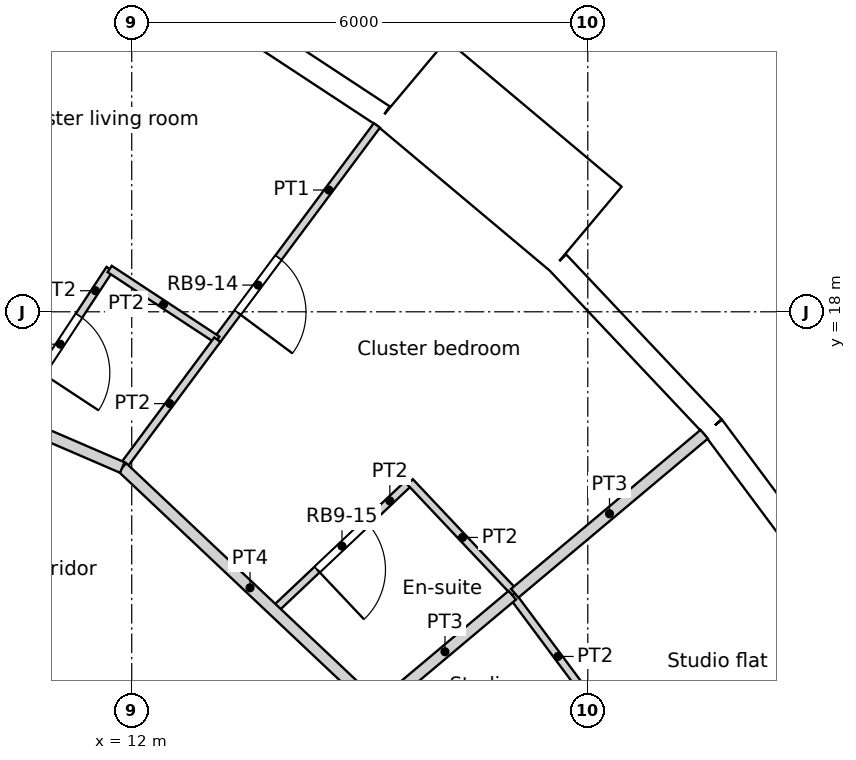
"""IFC4 building model, lengths in metres.
Left out: names, types, materials, properties, quantities, classifications, styles, units other than length and angle.
Written with IfcOpenShell. Run it as: python <this file> out.ifc"""

import sys

from ifc_helpers import new_model, si_unit, direction, frame, frame_2d, origin, origin_2d, place, context, subcontext, project, spatial, rectangle, circle, extrude, element, fill, save


model = new_model("IFC4")
c1 = context("Model", 3, precision=1e-05, world=origin(), true_north=direction((0.0, 1.0)))
c2 = subcontext(c1, "Body", "Model", "MODEL_VIEW")
j1 = project(units=[si_unit("LENGTHUNIT", "METRE"), si_unit("PLANEANGLEUNIT", "RADIAN")], contexts=[c1])
p1 = place(None, origin())
s1 = spatial("IfcSite", under=j1, at=p1, CompositionType="ELEMENT")
p2 = place(p1, origin())
s2 = spatial("IfcBuilding", under=s1, at=p2, CompositionType="ELEMENT")
p3 = place(p2, frame((0.0, 0.0, 212.4)))
s3 = spatial("IfcBuildingStorey", under=s2, at=p3, CompositionType="ELEMENT", Elevation=212.4)
for number, where, z_axis, x_axis in (
    (1, (18.805, 15.779, 0.0), (0.0, 0.0, 1.0), (1.0, 0.0, 0.0)),
    (2, (14.659, 19.69, 0.0), (0.0, 0.0, 1.0), (1.0, 0.0, 0.0)),
):
    element("IfcColumn", number, at=place(p3, frame(where, z_axis=z_axis, x_axis=x_axis)), inside=s3, PredefinedType="COLUMN", context=c2, shape_type="SweptSolid", body=[
        extrude(circle(Radius=0.6, at=origin_2d()), origin(), (0.0, 0.0, 1.0), 3.6),
    ])
p4 = place(p3, frame((11.735, 14.716, 0.0), z_axis=(0.0, 0.0, 1.0), x_axis=(1.0, 0.0, 0.0)))
e3 = element("IfcColumn", 3, at=p4, inside=s3, PredefinedType="COLUMN", context=c2, shape_type="SweptSolid", body=[
    extrude(circle(Radius=0.65, at=origin_2d()), origin(), (0.0, 0.0, 1.0), 3.6),
])
p5 = place(p3, frame((21.422, 14.101, 0.0), z_axis=(0.0, 0.0, 1.0), x_axis=(-0.597197580538, 0.80209416517, 0.0)))
e4 = element("IfcWall", 4, at=p5, inside=s3, PredefinedType="SOLIDWALL", context=c2, shape_type="SweptSolid", body=[
    extrude(rectangle(XDim=2.973, YDim=0.3, at=frame_2d((1.486, 0.0))), origin(), (0.0, 0.0, 1.0), 3.3),
])
p6 = place(p5, frame((1.486, 0.0, 1.55)))
e5 = element("IfcOpeningElement", 5, at=p6, cuts=e4, PredefinedType="OPENING", context=c2, shape_type="SweptSolid", body=[
    extrude(circle(Radius=0.9, at=origin_2d()), frame((0.0, 0.16, 0.0), z_axis=(0.0, -1.0, 0.0), x_axis=(1.0, 0.0, 0.0)), (0.0, 0.0, 1.0), 0.32),
])
p7 = place(p3, frame((19.647, 16.486, 0.0), z_axis=(0.0, 0.0, 1.0), x_axis=(-0.686235184166, 0.727379730273, 0.0)))
e6 = element("IfcWall", 6, at=p7, inside=s3, PredefinedType="SOLIDWALL", context=c2, shape_type="SweptSolid", body=[
    extrude(rectangle(XDim=2.973, YDim=0.3, at=frame_2d((1.486, 0.0))), origin(), (0.0, 0.0, 1.0), 3.3),
])
p8 = place(p7, frame((1.486, 0.0, 1.55)))
e7 = element("IfcOpeningElement", 7, at=p8, cuts=e6, PredefinedType="OPENING", context=c2, shape_type="SweptSolid", body=[
    extrude(circle(Radius=0.9, at=origin_2d()), frame((0.0, 0.16, 0.0), z_axis=(0.0, -1.0, 0.0), x_axis=(1.0, 0.0, 0.0)), (0.0, 0.0, 1.0), 0.32),
])
p9 = place(p3, frame((17.977, 19.09, -0.3), z_axis=(0.0, 0.0, 1.0), x_axis=(-0.766022196139, 0.642814121673, 0.0)))
e8 = element("IfcWall", 8, at=p9, inside=s3, PredefinedType="ELEMENTEDWALL", context=c2, shape_type="SweptSolid", body=[
    extrude(rectangle(XDim=3.0, YDim=1.45, at=frame_2d((1.5, 0.0))), origin(), (0.0, 0.0, 1.0), 3.6),
])
p10 = place(p9, frame((1.5, 0.0, 1.85)))
e9 = element("IfcOpeningElement", 9, at=p10, cuts=e8, PredefinedType="OPENING", context=c2, shape_type="SweptSolid", body=[
    extrude(circle(Radius=0.9, at=origin_2d()), frame((0.0, 0.735, 0.0), z_axis=(0.0, -1.0, 0.0), x_axis=(1.0, 0.0, 0.0)), (0.0, 0.0, 1.0), 1.47),
])
p11 = place(p3, frame((15.308, 20.578, 0.0), z_axis=(0.0, 0.0, 1.0), x_axis=(-0.835470659512, 0.549535055382, 0.0)))
e10 = element("IfcWall", 10, at=p11, inside=s3, PredefinedType="SOLIDWALL", context=c2, shape_type="SweptSolid", body=[
    extrude(rectangle(XDim=2.973, YDim=0.3, at=frame_2d((1.487, 0.0))), origin(), (0.0, 0.0, 1.0), 3.3),
])
p12 = place(p11, frame((1.486, 0.0, 1.55)))
e11 = element("IfcOpeningElement", 11, at=p12, cuts=e10, PredefinedType="OPENING", context=c2, shape_type="SweptSolid", body=[
    extrude(circle(Radius=0.9, at=origin_2d()), frame((0.0, 0.16, 0.0), z_axis=(0.0, -1.0, 0.0), x_axis=(1.0, 0.0, 0.0)), (0.0, 0.0, 1.0), 0.32),
])
p13 = place(p3, frame((11.877, 15.953, 0.0), z_axis=(0.0, 0.0, 1.0), x_axis=(0.727299029876, -0.686320713035, 0.0)))
e12 = element("IfcWall", 12, at=p13, inside=s3, PredefinedType="PARTITIONING", context=c2, shape_type="SweptSolid", body=[
    extrude(rectangle(XDim=4.617, YDim=0.15, at=frame_2d((2.309, 0.0))), origin(), (0.0, 0.0, 1.0), 3.15),
])
p14 = place(p3, frame((4.452, 16.614, 0.0), z_axis=(0.0, 0.0, 1.0), x_axis=(0.866005203721, -0.500034985904, 0.0)))
e13 = element("IfcWall", 13, at=p14, inside=s3, PredefinedType="PARTITIONING", context=c2, shape_type="SweptSolid", body=[
    extrude(rectangle(XDim=8.903, YDim=0.15, at=frame_2d((4.452, 0.0))), origin(), (0.0, 0.0, 1.0), 3.15),
])
p15 = place(p3, frame((3.453, 19.586, 0.0), z_axis=(0.0, 0.0, 1.0), x_axis=(0.918175908205, -0.396172944044, 0.0)))
e14 = element("IfcWall", 14, at=p15, inside=s3, PredefinedType="PARTITIONING", context=c2, shape_type="SweptSolid", body=[
    extrude(rectangle(XDim=9.173, YDim=0.15, at=frame_2d((4.587, 0.0))), origin(), (0.0, 0.0, 1.0), 3.15),
])
p16 = place(p15, frame((5.531, 0.0, 0.0)))
e15 = element("IfcOpeningElement", 15, at=p16, cuts=e14, PredefinedType="OPENING", context=c2, shape_type="SweptSolid", body=[
    extrude(rectangle(XDim=1.1, YDim=2.1, at=frame_2d((0.55, 1.05))), frame((0.0, 0.075, 0.0), z_axis=(0.0, -1.0, 0.0), x_axis=(1.0, 0.0, 0.0)), (0.0, 0.0, 1.0), 0.15),
])
p17 = place(p3, frame((17.007, 14.271, 0.0), z_axis=(0.0, 0.0, 1.0), x_axis=(0.597019866774, -0.802226450996, 0.0)))
e16 = element("IfcWall", 16, at=p17, inside=s3, PredefinedType="PARTITIONING", context=c2, shape_type="SweptSolid", body=[
    extrude(rectangle(XDim=2.008, YDim=0.1, at=frame_2d((1.004, 0.0))), origin(), (0.0, 0.0, 1.0), 3.15),
])
p18 = place(p3, frame((17.039, 14.297, 0.0), z_axis=(0.0, 0.0, 1.0), x_axis=(0.766046154737, 0.642785569854, 0.0)))
e17 = element("IfcWall", 17, at=p18, inside=s3, PredefinedType="PARTITIONING", context=c2, shape_type="SweptSolid", body=[
    extrude(rectangle(XDim=3.254, YDim=0.15, at=frame_2d((1.627, 0.0))), origin(), (0.0, 0.0, 1.0), 3.15),
])
p19 = place(p3, frame((15.235, 12.784, 0.0), z_axis=(0.0, 0.0, 1.0), x_axis=(0.766002094084, 0.642838075925, 0.0)))
e18 = element("IfcWall", 18, at=p19, inside=s3, PredefinedType="PARTITIONING", context=c2, shape_type="SweptSolid", body=[
    extrude(rectangle(XDim=2.313, YDim=0.15, at=frame_2d((1.157, 0.0))), origin(), (0.0, 0.0, 1.0), 3.15),
])
p20 = place(p3, frame((11.71, 18.563, 0.0), z_axis=(0.0, 0.0, 1.0), x_axis=(0.835601560763, -0.549335991584, 0.0)))
e19 = element("IfcWall", 19, at=p20, inside=s3, PredefinedType="PARTITIONING", context=c2, shape_type="SweptSolid", body=[
    extrude(rectangle(XDim=1.695, YDim=0.1, at=frame_2d((0.847, 0.0))), origin(), (0.0, 0.0, 1.0), 3.15),
])
p21 = place(p3, frame((10.409, 16.585, 0.0), z_axis=(0.0, 0.0, 1.0), x_axis=(0.549525589293, 0.835476885804, 0.0)))
e20 = element("IfcWall", 20, at=p21, inside=s3, PredefinedType="PARTITIONING", context=c2, shape_type="SweptSolid", body=[
    extrude(rectangle(XDim=2.367, YDim=0.1, at=frame_2d((1.184, 0.0))), origin(), (0.0, 0.0, 1.0), 3.15),
])
p22 = place(p21, frame((0.733, 0.0, 0.0)))
e21 = element("IfcOpeningElement", 21, at=p22, cuts=e20, PredefinedType="OPENING", context=c2, shape_type="SweptSolid", body=[
    extrude(rectangle(XDim=0.9, YDim=2.0, at=frame_2d((0.45, 1.0))), frame((0.0, 0.05, 0.0), z_axis=(0.0, -1.0, 0.0), x_axis=(1.0, 0.0, 0.0)), (0.0, 0.0, 1.0), 0.1),
])
p23 = place(p3, frame((13.126, 17.632, 0.0), z_axis=(0.0, 0.0, 1.0), x_axis=(0.597307961824, 0.802011969201, 0.0)))
e22 = element("IfcWall", 22, at=p23, inside=s3, PredefinedType="PARTITIONING", context=c2, shape_type="SweptSolid", body=[
    extrude(rectangle(XDim=3.516, YDim=0.1, at=frame_2d((1.758, 0.0))), origin(), (0.0, 0.0, 1.0), 3.15),
])
p24 = place(p23, frame((0.447, 0.0, 0.0)))
e23 = element("IfcOpeningElement", 23, at=p24, cuts=e22, PredefinedType="OPENING", context=c2, shape_type="SweptSolid", body=[
    extrude(rectangle(XDim=0.9, YDim=2.1, at=frame_2d((0.45, 1.05))), frame((0.0, 0.05, 0.0), z_axis=(0.0, -1.0, 0.0), x_axis=(1.0, 0.0, 0.0)), (0.0, 0.0, 1.0), 0.1),
])
p25 = place(p3, frame((11.876, 15.952, 0.0), z_axis=(0.0, 0.0, 1.0), x_axis=(0.596899091673, 0.802316318144, 0.0)))
e24 = element("IfcWall", 24, at=p25, inside=s3, PredefinedType="PARTITIONING", context=c2, shape_type="SweptSolid", body=[
    extrude(rectangle(XDim=2.094, YDim=0.1, at=frame_2d((1.047, 0.0))), origin(), (0.0, 0.0, 1.0), 3.15),
])
p26 = place(p3, frame((15.662, 15.763, 0.0), z_axis=(0.0, 0.0, 1.0), x_axis=(0.686167098493, -0.727443958629, 0.0)))
e25 = element("IfcWall", 25, at=p26, inside=s3, PredefinedType="PARTITIONING", context=c2, shape_type="SweptSolid", body=[
    extrude(rectangle(XDim=2.011, YDim=0.1, at=frame_2d((1.005, 0.0))), origin(), (0.0, 0.0, 1.0), 3.15),
])
p27 = place(p3, frame((13.87, 14.072, 0.0), z_axis=(0.0, 0.0, 1.0), x_axis=(0.727320856717, 0.686297582237, 0.0)))
e26 = element("IfcWall", 26, at=p27, inside=s3, PredefinedType="PARTITIONING", context=c2, shape_type="SweptSolid", body=[
    extrude(rectangle(XDim=2.464, YDim=0.1, at=frame_2d((1.232, 0.0))), origin(), (0.0, 0.0, 1.0), 3.15),
])
p28 = place(p27, frame((0.782, 0.0, 0.0)))
e27 = element("IfcOpeningElement", 27, at=p28, cuts=e26, PredefinedType="OPENING", context=c2, shape_type="SweptSolid", body=[
    extrude(rectangle(XDim=0.9, YDim=2.04, at=frame_2d((0.45, 1.02))), frame((0.0, 0.05, 0.0), z_axis=(0.0, -1.0, 0.0), x_axis=(1.0, 0.0, 0.0)), (0.0, 0.0, 1.0), 0.1),
])
p29 = place(p6, origin())
e28 = element("IfcWindow", 28, at=p29, inside=s3, PartitioningType="SINGLE_PANEL", PredefinedType="WINDOW", context=c2, shape_type="SweptSolid", body=[
    extrude(circle(Radius=0.9, at=origin_2d()), frame((0.0, 0.12, 0.0), z_axis=(0.0, -1.0, 0.0), x_axis=(1.0, 0.0, 0.0)), (0.0, 0.0, 1.0), 0.1),
])
fill(e5, e28)
p30 = place(p8, origin())
e29 = element("IfcWindow", 29, at=p30, inside=s3, PartitioningType="SINGLE_PANEL", PredefinedType="WINDOW", context=c2, shape_type="SweptSolid", body=[
    extrude(circle(Radius=0.9, at=origin_2d()), frame((0.0, 0.12, 0.0), z_axis=(0.0, -1.0, 0.0), x_axis=(1.0, 0.0, 0.0)), (0.0, 0.0, 1.0), 0.1),
])
fill(e7, e29)
p31 = place(p10, origin())
e30 = element("IfcWindow", 30, at=p31, inside=s3, PartitioningType="SINGLE_PANEL", PredefinedType="WINDOW", context=c2, shape_type="SweptSolid", body=[
    extrude(circle(Radius=0.9, at=origin_2d()), frame((0.0, 0.695, 0.0), z_axis=(0.0, -1.0, 0.0), x_axis=(1.0, 0.0, 0.0)), (0.0, 0.0, 1.0), 0.1),
])
fill(e9, e30)
p32 = place(p12, origin())
e31 = element("IfcWindow", 31, at=p32, inside=s3, PartitioningType="SINGLE_PANEL", PredefinedType="WINDOW", context=c2, shape_type="SweptSolid", body=[
    extrude(circle(Radius=0.9, at=origin_2d()), frame((0.0, 0.12, 0.0), z_axis=(0.0, -1.0, 0.0), x_axis=(1.0, 0.0, 0.0)), (0.0, 0.0, 1.0), 0.1),
])
fill(e11, e31)
p33 = place(p22, origin())
e32 = element("IfcDoor", 32, at=p33, inside=s3, OperationType="SINGLE_SWING_RIGHT", PredefinedType="DOOR", context=c2, shape_type="SweptSolid", body=[
    extrude(rectangle(XDim=0.9, YDim=2.0, at=frame_2d((0.45, 1.0))), frame((0.0, 0.025, 0.0), z_axis=(0.0, -1.0, 0.0), x_axis=(1.0, 0.0, 0.0)), (0.0, 0.0, 1.0), 0.05),
])
fill(e21, e32)
p34 = place(p24, origin())
e33 = element("IfcDoor", 33, at=p34, inside=s3, OperationType="SINGLE_SWING_RIGHT", PredefinedType="DOOR", context=c2, shape_type="SweptSolid", body=[
    extrude(rectangle(XDim=0.9, YDim=2.1, at=frame_2d((0.45, 1.05))), frame((0.0, 0.025, 0.0), z_axis=(0.0, -1.0, 0.0), x_axis=(1.0, 0.0, 0.0)), (0.0, 0.0, 1.0), 0.05),
])
fill(e23, e33)
p35 = place(p28, origin())
e34 = element("IfcDoor", 34, at=p35, inside=s3, OperationType="SINGLE_SWING_RIGHT", PredefinedType="DOOR", context=c2, shape_type="SweptSolid", body=[
    extrude(rectangle(XDim=0.9, YDim=2.04, at=frame_2d((0.45, 1.02))), frame((0.0, 0.025, 0.0), z_axis=(0.0, -1.0, 0.0), x_axis=(1.0, 0.0, 0.0)), (0.0, 0.0, 1.0), 0.05),
])
fill(e27, e34)
save(model, sys.argv[1])
